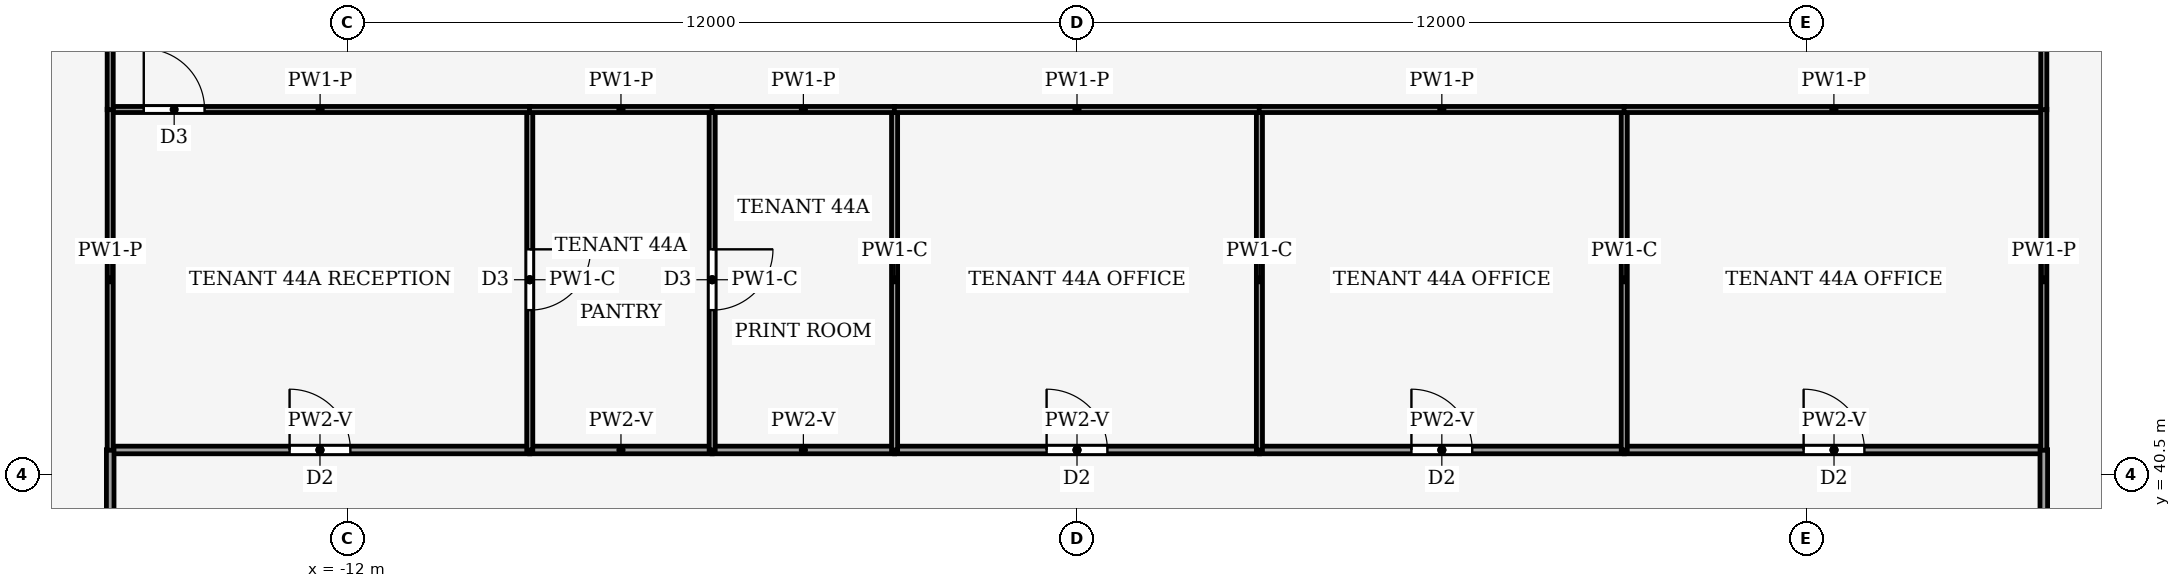
"""IFC4 building model, lengths in metres.
Left out: names, types, materials, properties, quantities, classifications, styles, units other than length and angle.
Written with IfcOpenShell. Run it as: python <this file> out.ifc"""

import sys

from ifc_helpers import new_model, si_unit, direction, frame, frame_2d, origin, place, context, subcontext, project, spatial, rectangle, extrude, element, fill, save


model = new_model("IFC4")
c1 = context("Model", 3, precision=1e-05, world=origin(), true_north=direction((0.0, 1.0)))
c2 = subcontext(c1, "Body", "Model", "MODEL_VIEW")
j1 = project(units=[si_unit("LENGTHUNIT", "METRE"), si_unit("PLANEANGLEUNIT", "RADIAN")], contexts=[c1])
p1 = place(None, origin())
s1 = spatial("IfcSite", under=j1, at=p1, CompositionType="ELEMENT")
p2 = place(p1, origin())
s2 = spatial("IfcBuilding", under=s1, at=p2, CompositionType="ELEMENT")
p3 = place(p2, frame((0.0, 0.0, 194.0)))
s3 = spatial("IfcBuildingStorey", under=s2, at=p3, CompositionType="ELEMENT", Elevation=194.0)
p4 = place(p3, frame((-15.9, 40.9, 0.0), z_axis=(0.0, 0.0, 1.0), x_axis=(1.0, 0.0, 0.0)))
e1 = element("IfcWall", 1, at=p4, inside=s3, PredefinedType="PARTITIONING", context=c2, shape_type="SweptSolid", body=[
    extrude(rectangle(XDim=6.9, YDim=0.125, at=frame_2d((3.45, 0.0))), origin(), (0.0, 0.0, 1.0), 3.44),
])
p5 = place(p4, frame((2.95, 0.0, 0.0)))
e2 = element("IfcOpeningElement", 2, at=p5, cuts=e1, PredefinedType="OPENING", context=c2, shape_type="SweptSolid", body=[
    extrude(rectangle(XDim=1.0, YDim=2.1, at=frame_2d((0.5, 1.05))), frame((0.0, 0.073, 0.0), z_axis=(0.0, -1.0, 0.0), x_axis=(1.0, 0.0, 0.0)), (0.0, 0.0, 1.0), 0.145),
])
for number, where, z_axis, x_axis in (
    (3, (-6.0, 40.9, 0.0), (0.0, 0.0, 1.0), (-1.0, 0.0, 0.0)),
    (4, (-3.0, 40.9, 0.0), (0.0, 0.0, 1.0), (-1.0, 0.0, 0.0)),
):
    element("IfcWall", number, at=place(p3, frame(where, z_axis=z_axis, x_axis=x_axis)), inside=s3, PredefinedType="PARTITIONING", context=c2, shape_type="SweptSolid", body=[
        extrude(rectangle(XDim=3.0, YDim=0.125, at=frame_2d((1.5, 0.0))), origin(), (0.0, 0.0, 1.0), 3.44),
    ])
p6 = place(p3, frame((-3.0, 40.9, 0.0), z_axis=(0.0, 0.0, 1.0), x_axis=(1.0, 0.0, 0.0)))
e5 = element("IfcWall", 5, at=p6, inside=s3, PredefinedType="PARTITIONING", context=c2, shape_type="SweptSolid", body=[
    extrude(rectangle(XDim=6.0, YDim=0.125, at=frame_2d((3.0, 0.0))), origin(), (0.0, 0.0, 1.0), 3.44),
])
p7 = place(p6, frame((2.5, 0.0, 0.0)))
e6 = element("IfcOpeningElement", 6, at=p7, cuts=e5, PredefinedType="OPENING", context=c2, shape_type="SweptSolid", body=[
    extrude(rectangle(XDim=1.0, YDim=2.1, at=frame_2d((0.5, 1.05))), frame((0.0, 0.073, 0.0), z_axis=(0.0, -1.0, 0.0), x_axis=(1.0, 0.0, 0.0)), (0.0, 0.0, 1.0), 0.145),
])
p8 = place(p3, frame((3.0, 40.9, 0.0), z_axis=(0.0, 0.0, 1.0), x_axis=(1.0, 0.0, 0.0)))
e7 = element("IfcWall", 7, at=p8, inside=s3, PredefinedType="PARTITIONING", context=c2, shape_type="SweptSolid", body=[
    extrude(rectangle(XDim=6.0, YDim=0.125, at=frame_2d((3.0, 0.0))), origin(), (0.0, 0.0, 1.0), 3.44),
])
p9 = place(p8, frame((2.5, 0.0, 0.0)))
e8 = element("IfcOpeningElement", 8, at=p9, cuts=e7, PredefinedType="OPENING", context=c2, shape_type="SweptSolid", body=[
    extrude(rectangle(XDim=1.0, YDim=2.1, at=frame_2d((0.5, 1.05))), frame((0.0, 0.073, 0.0), z_axis=(0.0, -1.0, 0.0), x_axis=(1.0, 0.0, 0.0)), (0.0, 0.0, 1.0), 0.145),
])
p10 = place(p3, frame((9.0, 40.9, 0.0), z_axis=(0.0, 0.0, 1.0), x_axis=(1.0, 0.0, 0.0)))
e9 = element("IfcWall", 9, at=p10, inside=s3, PredefinedType="PARTITIONING", context=c2, shape_type="SweptSolid", body=[
    extrude(rectangle(XDim=6.9, YDim=0.125, at=frame_2d((3.45, 0.0))), origin(), (0.0, 0.0, 1.0), 3.44),
])
p11 = place(p10, frame((2.95, 0.0, 0.0)))
e10 = element("IfcOpeningElement", 10, at=p11, cuts=e9, PredefinedType="OPENING", context=c2, shape_type="SweptSolid", body=[
    extrude(rectangle(XDim=1.0, YDim=2.1, at=frame_2d((0.5, 1.05))), frame((0.0, 0.073, 0.0), z_axis=(0.0, -1.0, 0.0), x_axis=(1.0, 0.0, 0.0)), (0.0, 0.0, 1.0), 0.145),
])
p12 = place(p3, frame((-15.9, 34.5, 0.0), z_axis=(0.0, 0.0, 1.0), x_axis=(0.0, 1.0, 0.0)))
e11 = element("IfcWall", 11, at=p12, inside=s3, PredefinedType="PARTITIONING", context=c2, shape_type="SweptSolid", body=[
    extrude(rectangle(XDim=6.404, YDim=0.125, at=frame_2d((3.202, 0.0))), origin(), (0.0, 0.0, 1.0), 3.14),
])
p13 = place(p12, frame((2.702, 0.0, 0.0)))
e12 = element("IfcOpeningElement", 12, at=p13, cuts=e11, PredefinedType="OPENING", context=c2, shape_type="SweptSolid", body=[
    extrude(rectangle(XDim=1.0, YDim=2.1, at=frame_2d((0.5, 1.05))), frame((0.0, 0.073, 0.0), z_axis=(0.0, -1.0, 0.0), x_axis=(1.0, 0.0, 0.0)), (0.0, 0.0, 1.0), 0.145),
])
p14 = place(p3, frame((15.9, 40.904, 0.0), z_axis=(0.0, 0.0, 1.0), x_axis=(0.0, -1.0, 0.0)))
e13 = element("IfcWall", 13, at=p14, inside=s3, PredefinedType="PARTITIONING", context=c2, shape_type="SweptSolid", body=[
    extrude(rectangle(XDim=3.404, YDim=0.125, at=frame_2d((1.702, 0.0))), origin(), (0.0, 0.0, 1.0), 3.14),
])
p15 = place(p14, frame((1.202, 0.0, 0.0)))
e14 = element("IfcOpeningElement", 14, at=p15, cuts=e13, PredefinedType="OPENING", context=c2, shape_type="SweptSolid", body=[
    extrude(rectangle(XDim=1.0, YDim=2.1, at=frame_2d((0.5, 1.05))), frame((0.0, 0.073, 0.0), z_axis=(0.0, -1.0, 0.0), x_axis=(1.0, 0.0, 0.0)), (0.0, 0.0, 1.0), 0.145),
])
p16 = place(p3, frame((-9.0, 46.5, 0.0), z_axis=(0.0, 0.0, 1.0), x_axis=(0.0, -1.0, 0.0)))
e15 = element("IfcWall", 15, at=p16, inside=s3, PredefinedType="PARTITIONING", context=c2, shape_type="SweptSolid", body=[
    extrude(rectangle(XDim=5.6, YDim=0.1, at=frame_2d((2.8, 0.0))), origin(), (0.0, 0.0, 1.0), 3.87),
])
p17 = place(p16, frame((2.3, 0.0, 0.0)))
e16 = element("IfcOpeningElement", 16, at=p17, cuts=e15, PredefinedType="OPENING", context=c2, shape_type="SweptSolid", body=[
    extrude(rectangle(XDim=1.0, YDim=2.1, at=frame_2d((0.5, 1.05))), frame((0.0, 0.06, 0.0), z_axis=(0.0, -1.0, 0.0), x_axis=(1.0, 0.0, 0.0)), (0.0, 0.0, 1.0), 0.12),
])
p18 = place(p3, frame((-15.9, 46.5, 0.0), z_axis=(0.0, 0.0, 1.0), x_axis=(1.0, 0.0, 0.0)))
e17 = element("IfcWall", 17, at=p18, inside=s3, PredefinedType="PARTITIONING", context=c2, shape_type="SweptSolid", body=[
    extrude(rectangle(XDim=6.904, YDim=0.1, at=frame_2d((3.452, 0.0))), origin(), (0.0, 0.0, 1.0), 3.44),
])
p19 = place(p18, frame((0.552, 0.0, 0.0)))
e18 = element("IfcOpeningElement", 18, at=p19, cuts=e17, PredefinedType="OPENING", context=c2, shape_type="SweptSolid", body=[
    extrude(rectangle(XDim=1.0, YDim=2.1, at=frame_2d((0.5, 1.05))), frame((0.0, 0.06, 0.0), z_axis=(0.0, -1.0, 0.0), x_axis=(1.0, 0.0, 0.0)), (0.0, 0.0, 1.0), 0.12),
])
p20 = place(p3, frame((-15.9, 46.504, 0.0), z_axis=(0.0, 0.0, 1.0), x_axis=(0.0, -1.0, 0.0)))
e19 = element("IfcWall", 19, at=p20, inside=s3, PredefinedType="PARTITIONING", context=c2, shape_type="SweptSolid", body=[
    extrude(rectangle(XDim=5.608, YDim=0.1, at=frame_2d((2.804, 0.0))), origin(), (0.0, 0.0, 1.0), 3.44),
])
p21 = place(p3, frame((-6.0, 46.5, 0.0), z_axis=(0.0, 0.0, 1.0), x_axis=(0.0, -1.0, 0.0)))
e20 = element("IfcWall", 20, at=p21, inside=s3, PredefinedType="PARTITIONING", context=c2, shape_type="SweptSolid", body=[
    extrude(rectangle(XDim=5.6, YDim=0.1, at=frame_2d((2.8, 0.0))), origin(), (0.0, 0.0, 1.0), 3.87),
])
p22 = place(p21, frame((2.3, 0.0, 0.0)))
e21 = element("IfcOpeningElement", 21, at=p22, cuts=e20, PredefinedType="OPENING", context=c2, shape_type="SweptSolid", body=[
    extrude(rectangle(XDim=1.0, YDim=2.1, at=frame_2d((0.5, 1.05))), frame((0.0, 0.06, 0.0), z_axis=(0.0, -1.0, 0.0), x_axis=(1.0, 0.0, 0.0)), (0.0, 0.0, 1.0), 0.12),
])
p23 = place(p3, frame((-5.996, 46.5, 0.0), z_axis=(0.0, 0.0, 1.0), x_axis=(-1.0, 0.0, 0.0)))
e22 = element("IfcWall", 22, at=p23, inside=s3, PredefinedType="PARTITIONING", context=c2, shape_type="SweptSolid", body=[
    extrude(rectangle(XDim=3.008, YDim=0.1, at=frame_2d((1.504, 0.0))), origin(), (0.0, 0.0, 1.0), 3.44),
])
p24 = place(p3, frame((-3.0, 40.9, 0.0), z_axis=(0.0, 0.0, 1.0), x_axis=(0.0, 1.0, 0.0)))
e23 = element("IfcWall", 23, at=p24, inside=s3, PredefinedType="PARTITIONING", context=c2, shape_type="SweptSolid", body=[
    extrude(rectangle(XDim=5.6, YDim=0.1, at=frame_2d((2.8, 0.0))), origin(), (0.0, 0.0, 1.0), 3.87),
])
p25 = place(p3, frame((-2.996, 46.5, 0.0), z_axis=(0.0, 0.0, 1.0), x_axis=(-1.0, 0.0, 0.0)))
e24 = element("IfcWall", 24, at=p25, inside=s3, PredefinedType="PARTITIONING", context=c2, shape_type="SweptSolid", body=[
    extrude(rectangle(XDim=3.008, YDim=0.1, at=frame_2d((1.504, 0.0))), origin(), (0.0, 0.0, 1.0), 3.44),
])
p26 = place(p3, frame((3.0, 40.9, 0.0), z_axis=(0.0, 0.0, 1.0), x_axis=(0.0, 1.0, 0.0)))
e25 = element("IfcWall", 25, at=p26, inside=s3, PredefinedType="PARTITIONING", context=c2, shape_type="SweptSolid", body=[
    extrude(rectangle(XDim=5.6, YDim=0.1, at=frame_2d((2.8, 0.0))), origin(), (0.0, 0.0, 1.0), 3.87),
])
p27 = place(p3, frame((3.004, 46.5, 0.0), z_axis=(0.0, 0.0, 1.0), x_axis=(-1.0, 0.0, 0.0)))
e26 = element("IfcWall", 26, at=p27, inside=s3, PredefinedType="PARTITIONING", context=c2, shape_type="SweptSolid", body=[
    extrude(rectangle(XDim=6.008, YDim=0.1, at=frame_2d((3.004, 0.0))), origin(), (0.0, 0.0, 1.0), 3.44),
])
p28 = place(p3, frame((9.0, 40.9, 0.0), z_axis=(0.0, 0.0, 1.0), x_axis=(0.0, 1.0, 0.0)))
e27 = element("IfcWall", 27, at=p28, inside=s3, PredefinedType="PARTITIONING", context=c2, shape_type="SweptSolid", body=[
    extrude(rectangle(XDim=5.6, YDim=0.1, at=frame_2d((2.8, 0.0))), origin(), (0.0, 0.0, 1.0), 3.87),
])
p29 = place(p3, frame((9.004, 46.5, 0.0), z_axis=(0.0, 0.0, 1.0), x_axis=(-1.0, 0.0, 0.0)))
e28 = element("IfcWall", 28, at=p29, inside=s3, PredefinedType="PARTITIONING", context=c2, shape_type="SweptSolid", body=[
    extrude(rectangle(XDim=6.008, YDim=0.1, at=frame_2d((3.004, 0.0))), origin(), (0.0, 0.0, 1.0), 3.44),
])
p30 = place(p3, frame((15.9, 46.5, 0.0), z_axis=(0.0, 0.0, 1.0), x_axis=(-1.0, 0.0, 0.0)))
e29 = element("IfcWall", 29, at=p30, inside=s3, PredefinedType="PARTITIONING", context=c2, shape_type="SweptSolid", body=[
    extrude(rectangle(XDim=6.904, YDim=0.1, at=frame_2d((3.452, 0.0))), origin(), (0.0, 0.0, 1.0), 3.44),
])
p31 = place(p3, frame((15.9, 40.896, 0.0), z_axis=(0.0, 0.0, 1.0), x_axis=(0.0, 1.0, 0.0)))
e30 = element("IfcWall", 30, at=p31, inside=s3, PredefinedType="PARTITIONING", context=c2, shape_type="SweptSolid", body=[
    extrude(rectangle(XDim=5.608, YDim=0.1, at=frame_2d((2.804, 0.0))), origin(), (0.0, 0.0, 1.0), 3.44),
])
for number, where, z_axis, x_axis in (
    (31, (-15.9, 61.504, 0.0), (0.0, 0.0, 1.0), (0.0, -1.0, 0.0)),
    (32, (15.9, 46.496, 0.0), (0.0, 0.0, 1.0), (0.0, 1.0, 0.0)),
):
    element("IfcWall", number, at=place(p3, frame(where, z_axis=z_axis, x_axis=x_axis)), inside=s3, PredefinedType="PARTITIONING", context=c2, shape_type="SweptSolid", body=[
        extrude(rectangle(XDim=15.008, YDim=0.1, at=frame_2d((7.504, 0.0))), origin(), (0.0, 0.0, 1.0), 3.24),
    ])
p32 = place(p5, origin())
e33 = element("IfcDoor", 33, at=p32, inside=s3, OperationType="SINGLE_SWING_LEFT", PredefinedType="DOOR", context=c2, shape_type="SweptSolid", body=[
    extrude(rectangle(XDim=1.0, YDim=2.1, at=frame_2d((0.5, 1.05))), frame((0.0, 0.025, 0.0), z_axis=(0.0, -1.0, 0.0), x_axis=(1.0, 0.0, 0.0)), (0.0, 0.0, 1.0), 0.05),
])
fill(e2, e33)
p33 = place(p7, origin())
e34 = element("IfcDoor", 34, at=p33, inside=s3, OperationType="SINGLE_SWING_RIGHT", PredefinedType="DOOR", context=c2, shape_type="SweptSolid", body=[
    extrude(rectangle(XDim=1.0, YDim=2.1, at=frame_2d((0.5, 1.05))), frame((0.0, 0.025, 0.0), z_axis=(0.0, -1.0, 0.0), x_axis=(1.0, 0.0, 0.0)), (0.0, 0.0, 1.0), 0.05),
])
fill(e6, e34)
p34 = place(p9, origin())
e35 = element("IfcDoor", 35, at=p34, inside=s3, OperationType="SINGLE_SWING_LEFT", PredefinedType="DOOR", context=c2, shape_type="SweptSolid", body=[
    extrude(rectangle(XDim=1.0, YDim=2.1, at=frame_2d((0.5, 1.05))), frame((0.0, 0.025, 0.0), z_axis=(0.0, -1.0, 0.0), x_axis=(1.0, 0.0, 0.0)), (0.0, 0.0, 1.0), 0.05),
])
fill(e8, e35)
p35 = place(p11, origin())
e36 = element("IfcDoor", 36, at=p35, inside=s3, OperationType="SINGLE_SWING_RIGHT", PredefinedType="DOOR", context=c2, shape_type="SweptSolid", body=[
    extrude(rectangle(XDim=1.0, YDim=2.1, at=frame_2d((0.5, 1.05))), frame((0.0, 0.025, 0.0), z_axis=(0.0, -1.0, 0.0), x_axis=(1.0, 0.0, 0.0)), (0.0, 0.0, 1.0), 0.05),
])
fill(e10, e36)
p36 = place(p17, origin())
e37 = element("IfcDoor", 37, at=p36, inside=s3, OperationType="SINGLE_SWING_RIGHT", PredefinedType="DOOR", context=c2, shape_type="SweptSolid", body=[
    extrude(rectangle(XDim=1.0, YDim=2.1, at=frame_2d((0.5, 1.05))), frame((0.0, 0.025, 0.0), z_axis=(0.0, -1.0, 0.0), x_axis=(1.0, 0.0, 0.0)), (0.0, 0.0, 1.0), 0.05),
])
fill(e16, e37)
p37 = place(p19, origin())
e38 = element("IfcDoor", 38, at=p37, inside=s3, OperationType="SINGLE_SWING_LEFT", PredefinedType="DOOR", context=c2, shape_type="SweptSolid", body=[
    extrude(rectangle(XDim=1.0, YDim=2.1, at=frame_2d((0.5, 1.05))), frame((0.0, 0.025, 0.0), z_axis=(0.0, -1.0, 0.0), x_axis=(1.0, 0.0, 0.0)), (0.0, 0.0, 1.0), 0.05),
])
fill(e18, e38)
p38 = place(p22, origin())
e39 = element("IfcDoor", 39, at=p38, inside=s3, OperationType="SINGLE_SWING_RIGHT", PredefinedType="DOOR", context=c2, shape_type="SweptSolid", body=[
    extrude(rectangle(XDim=1.0, YDim=2.1, at=frame_2d((0.5, 1.05))), frame((0.0, 0.025, 0.0), z_axis=(0.0, -1.0, 0.0), x_axis=(1.0, 0.0, 0.0)), (0.0, 0.0, 1.0), 0.05),
])
fill(e21, e39)
save(model, sys.argv[1])
